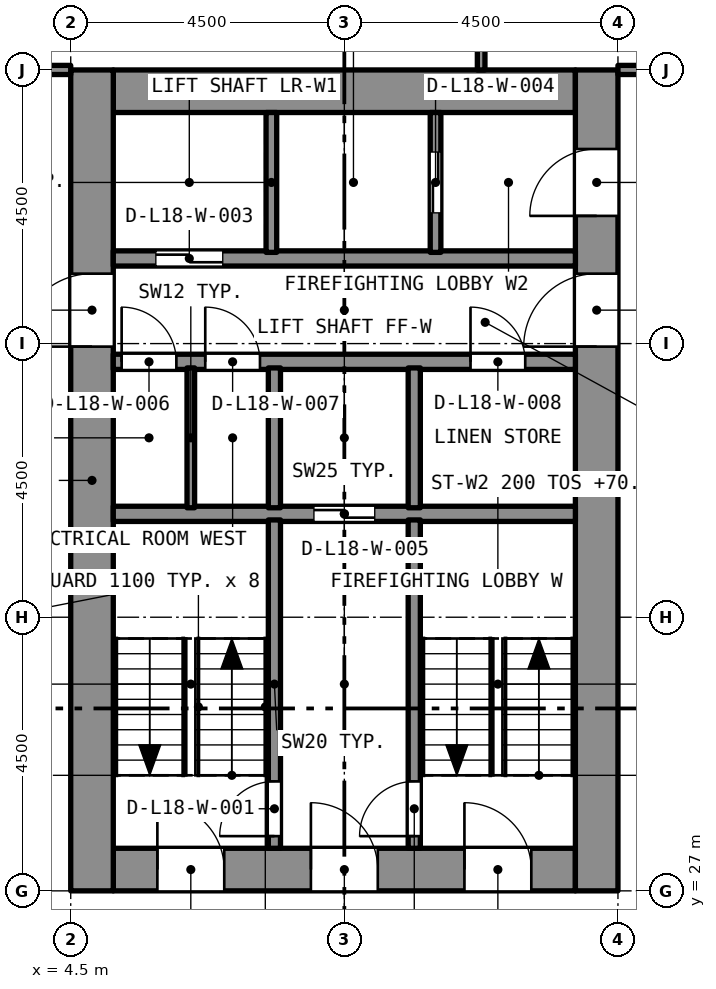
"""IFC4 building model, lengths in metres.
Left out: names, types, materials, properties, quantities, classifications, styles, units other than length and angle.
Written with IfcOpenShell. Run it as: python <this file> out.ifc"""

import sys

from ifc_helpers import new_model, si_unit, direction, frame, frame_2d, origin, place, context, subcontext, project, spatial, rectangle, extrude, element, fill, save


model = new_model("IFC4")
c1 = context("Model", 3, precision=1e-05, world=origin(), true_north=direction((0.0, 1.0)))
c2 = subcontext(c1, "Body", "Model", "MODEL_VIEW")
j1 = project(units=[si_unit("LENGTHUNIT", "METRE"), si_unit("PLANEANGLEUNIT", "RADIAN")], contexts=[c1])
p1 = place(None, origin())
s1 = spatial("IfcSite", under=j1, at=p1, CompositionType="ELEMENT")
p2 = place(p1, origin())
s2 = spatial("IfcBuilding", under=s1, at=p2, CompositionType="ELEMENT")
p3 = place(p2, frame((0.0, 0.0, 68.8)))
s3 = spatial("IfcBuildingStorey", under=s2, at=p3, CompositionType="ELEMENT", Elevation=68.8)
p4 = place(p3, frame((5.2, 27.35, 0.0), z_axis=(0.0, 0.0, 1.0), x_axis=(1.0, 0.0, 0.0)))
e1 = element("IfcWall", 1, at=p4, inside=s3, PredefinedType="SOLIDWALL", context=c2, shape_type="SweptSolid", body=[
    extrude(rectangle(XDim=7.6, YDim=0.7, at=frame_2d((3.8, 0.0))), origin(), (0.0, 0.0, 1.0), 3.2),
])
p5 = place(p4, frame((0.725, 0.0, 0.0)))
e2 = element("IfcOpeningElement", 2, at=p5, cuts=e1, PredefinedType="OPENING", context=c2, shape_type="SweptSolid", body=[
    extrude(rectangle(XDim=1.1, YDim=2.1, at=frame_2d((0.55, 1.05))), frame((0.0, 0.36, 0.0), z_axis=(0.0, -1.0, 0.0), x_axis=(1.0, 0.0, 0.0)), (0.0, 0.0, 1.0), 0.72),
])
p6 = place(p4, frame((3.25, 0.0, 0.0)))
e3 = element("IfcOpeningElement", 3, at=p6, cuts=e1, PredefinedType="OPENING", context=c2, shape_type="SweptSolid", body=[
    extrude(rectangle(XDim=1.1, YDim=2.1, at=frame_2d((0.55, 1.05))), frame((0.0, 0.36, 0.0), z_axis=(0.0, -1.0, 0.0), x_axis=(1.0, 0.0, 0.0)), (0.0, 0.0, 1.0), 0.72),
])
p7 = place(p4, frame((5.775, 0.0, 0.0)))
e4 = element("IfcOpeningElement", 4, at=p7, cuts=e1, PredefinedType="OPENING", context=c2, shape_type="SweptSolid", body=[
    extrude(rectangle(XDim=1.1, YDim=2.1, at=frame_2d((0.55, 1.05))), frame((0.0, 0.36, 0.0), z_axis=(0.0, -1.0, 0.0), x_axis=(1.0, 0.0, 0.0)), (0.0, 0.0, 1.0), 0.72),
])
p8 = place(p3, frame((5.2, 40.15, 0.0), z_axis=(0.0, 0.0, 1.0), x_axis=(1.0, 0.0, 0.0)))
e5 = element("IfcWall", 5, at=p8, inside=s3, PredefinedType="SOLIDWALL", context=c2, shape_type="SweptSolid", body=[
    extrude(rectangle(XDim=7.6, YDim=0.7, at=frame_2d((3.8, 0.0))), origin(), (0.0, 0.0, 1.0), 3.2),
])
p9 = place(p3, frame((4.85, 27.0, 0.0), z_axis=(0.0, 0.0, 1.0), x_axis=(0.0, 1.0, 0.0)))
e6 = element("IfcWall", 6, at=p9, inside=s3, PredefinedType="SOLIDWALL", context=c2, shape_type="SweptSolid", body=[
    extrude(rectangle(XDim=13.5, YDim=0.7, at=frame_2d((6.75, 0.0))), origin(), (0.0, 0.0, 1.0), 3.2),
])
p10 = place(p9, frame((8.95, 0.0, 0.0)))
e7 = element("IfcOpeningElement", 7, at=p10, cuts=e6, PredefinedType="OPENING", context=c2, shape_type="SweptSolid", body=[
    extrude(rectangle(XDim=1.2, YDim=2.1, at=frame_2d((0.6, 1.05))), frame((0.0, 0.36, 0.0), z_axis=(0.0, -1.0, 0.0), x_axis=(1.0, 0.0, 0.0)), (0.0, 0.0, 1.0), 0.72),
])
p11 = place(p3, frame((13.15, 27.0, 0.0), z_axis=(0.0, 0.0, 1.0), x_axis=(0.0, 1.0, 0.0)))
e8 = element("IfcWall", 8, at=p11, inside=s3, PredefinedType="SOLIDWALL", context=c2, shape_type="SweptSolid", body=[
    extrude(rectangle(XDim=13.5, YDim=0.7, at=frame_2d((6.75, 0.0))), origin(), (0.0, 0.0, 1.0), 3.2),
])
p12 = place(p11, frame((11.1, 0.0, 0.0)))
e9 = element("IfcOpeningElement", 9, at=p12, cuts=e8, PredefinedType="OPENING", context=c2, shape_type="SweptSolid", body=[
    extrude(rectangle(XDim=1.1, YDim=2.1, at=frame_2d((0.55, 1.05))), frame((0.0, 0.36, 0.0), z_axis=(0.0, -1.0, 0.0), x_axis=(1.0, 0.0, 0.0)), (0.0, 0.0, 1.0), 0.72),
])
p13 = place(p11, frame((8.95, 0.0, 0.0)))
e10 = element("IfcOpeningElement", 10, at=p13, cuts=e8, PredefinedType="OPENING", context=c2, shape_type="SweptSolid", body=[
    extrude(rectangle(XDim=1.2, YDim=2.1, at=frame_2d((0.6, 1.05))), frame((0.0, 0.36, 0.0), z_axis=(0.0, -1.0, 0.0), x_axis=(1.0, 0.0, 0.0)), (0.0, 0.0, 1.0), 0.72),
])
p14 = place(p3, frame((11.25, 40.5, 0.0), z_axis=(0.0, 0.0, 1.0), x_axis=(0.0, 1.0, 0.0)))
e11 = element("IfcWall", 11, at=p14, inside=s3, PredefinedType="PARTITIONING", context=c2, shape_type="SweptSolid", body=[
    extrude(rectangle(XDim=3.157, YDim=0.125, at=frame_2d((1.579, 0.0))), origin(), (0.0, 0.0, 1.0), 2.9),
])
p15 = place(p3, frame((13.5, 40.5, 0.0), z_axis=(0.0, 0.0, 1.0), x_axis=(1.0, 0.0, 0.0)))
e12 = element("IfcWall", 12, at=p15, inside=s3, PredefinedType="PARTITIONING", context=c2, shape_type="SweptSolid", body=[
    extrude(rectangle(XDim=3.8, YDim=0.15, at=frame_2d((1.9, 0.0))), origin(), (0.0, 0.0, 1.0), 2.9),
])
p16 = place(p3, frame((0.7, 40.5, 0.0), z_axis=(0.0, 0.0, 1.0), x_axis=(1.0, 0.0, 0.0)))
e13 = element("IfcWall", 13, at=p16, inside=s3, PredefinedType="PARTITIONING", context=c2, shape_type="SweptSolid", body=[
    extrude(rectangle(XDim=3.8, YDim=0.15, at=frame_2d((1.9, 0.0))), origin(), (0.0, 0.0, 1.0), 2.9),
])
p17 = place(p16, frame((1.05, 0.0, 0.0)))
e14 = element("IfcOpeningElement", 14, at=p17, cuts=e13, PredefinedType="OPENING", context=c2, shape_type="SweptSolid", body=[
    extrude(rectangle(XDim=1.0, YDim=2.1, at=frame_2d((0.5, 1.05))), frame((0.0, 0.085, 0.0), z_axis=(0.0, -1.0, 0.0), x_axis=(1.0, 0.0, 0.0)), (0.0, 0.0, 1.0), 0.17),
])
p18 = place(p3, frame((5.2, 33.2, 0.0), z_axis=(0.0, 0.0, 1.0), x_axis=(1.0, 0.0, 0.0)))
e15 = element("IfcWall", 15, at=p18, inside=s3, PredefinedType="SOLIDWALL", context=c2, shape_type="SweptSolid", body=[
    extrude(rectangle(XDim=7.6, YDim=0.25, at=frame_2d((3.8, 0.0))), origin(), (0.0, 0.0, 1.0), 2.9),
])
p19 = place(p18, frame((3.3, 0.0, 0.0)))
e16 = element("IfcOpeningElement", 16, at=p19, cuts=e15, PredefinedType="OPENING", context=c2, shape_type="SweptSolid", body=[
    extrude(rectangle(XDim=1.0, YDim=2.1, at=frame_2d((0.5, 1.05))), frame((0.0, 0.135, 0.0), z_axis=(0.0, -1.0, 0.0), x_axis=(1.0, 0.0, 0.0)), (0.0, 0.0, 1.0), 0.27),
])
p20 = place(p3, frame((5.2, 35.7, 0.0), z_axis=(0.0, 0.0, 1.0), x_axis=(1.0, 0.0, 0.0)))
e17 = element("IfcWall", 17, at=p20, inside=s3, PredefinedType="SOLIDWALL", context=c2, shape_type="SweptSolid", body=[
    extrude(rectangle(XDim=7.6, YDim=0.25, at=frame_2d((3.8, 0.0))), origin(), (0.0, 0.0, 1.0), 2.9),
])
p21 = place(p20, frame((0.137, 0.0, 0.0)))
e18 = element("IfcOpeningElement", 18, at=p21, cuts=e17, PredefinedType="OPENING", context=c2, shape_type="SweptSolid", body=[
    extrude(rectangle(XDim=0.9, YDim=2.1, at=frame_2d((0.45, 1.05))), frame((0.0, 0.135, 0.0), z_axis=(0.0, -1.0, 0.0), x_axis=(1.0, 0.0, 0.0)), (0.0, 0.0, 1.0), 0.27),
])
p22 = place(p20, frame((1.512, 0.0, 0.0)))
e19 = element("IfcOpeningElement", 19, at=p22, cuts=e17, PredefinedType="OPENING", context=c2, shape_type="SweptSolid", body=[
    extrude(rectangle(XDim=0.9, YDim=2.1, at=frame_2d((0.45, 1.05))), frame((0.0, 0.135, 0.0), z_axis=(0.0, -1.0, 0.0), x_axis=(1.0, 0.0, 0.0)), (0.0, 0.0, 1.0), 0.27),
])
p23 = place(p20, frame((5.875, 0.0, 0.0)))
e20 = element("IfcOpeningElement", 20, at=p23, cuts=e17, PredefinedType="OPENING", context=c2, shape_type="SweptSolid", body=[
    extrude(rectangle(XDim=0.9, YDim=2.1, at=frame_2d((0.45, 1.05))), frame((0.0, 0.135, 0.0), z_axis=(0.0, -1.0, 0.0), x_axis=(1.0, 0.0, 0.0)), (0.0, 0.0, 1.0), 0.27),
])
p24 = place(p3, frame((5.2, 37.4, 0.0), z_axis=(0.0, 0.0, 1.0), x_axis=(1.0, 0.0, 0.0)))
e21 = element("IfcWall", 21, at=p24, inside=s3, PredefinedType="SOLIDWALL", context=c2, shape_type="SweptSolid", body=[
    extrude(rectangle(XDim=7.6, YDim=0.25, at=frame_2d((3.8, 0.0))), origin(), (0.0, 0.0, 1.0), 2.9),
])
p25 = place(p24, frame((0.7, 0.0, 0.0)))
e22 = element("IfcOpeningElement", 22, at=p25, cuts=e21, PredefinedType="OPENING", context=c2, shape_type="SweptSolid", body=[
    extrude(rectangle(XDim=1.1, YDim=2.4, at=frame_2d((0.55, 1.2))), frame((0.0, 0.135, 0.0), z_axis=(0.0, -1.0, 0.0), x_axis=(1.0, 0.0, 0.0)), (0.0, 0.0, 1.0), 0.27),
])
p26 = place(p3, frame((7.85, 27.7, 0.0), z_axis=(0.0, 0.0, 1.0), x_axis=(0.0, 1.0, 0.0)))
e23 = element("IfcWall", 23, at=p26, inside=s3, PredefinedType="SOLIDWALL", context=c2, shape_type="SweptSolid", body=[
    extrude(rectangle(XDim=5.4, YDim=0.2, at=frame_2d((2.7, 0.0))), origin(), (0.0, 0.0, 1.0), 2.9),
])
p27 = place(p26, frame((0.2, 0.0, 0.0)))
e24 = element("IfcOpeningElement", 24, at=p27, cuts=e23, PredefinedType="OPENING", context=c2, shape_type="SweptSolid", body=[
    extrude(rectangle(XDim=0.9, YDim=2.1, at=frame_2d((0.45, 1.05))), frame((0.0, 0.11, 0.0), z_axis=(0.0, -1.0, 0.0), x_axis=(1.0, 0.0, 0.0)), (0.0, 0.0, 1.0), 0.22),
])
p28 = place(p3, frame((10.15, 27.7, 0.0), z_axis=(0.0, 0.0, 1.0), x_axis=(0.0, 1.0, 0.0)))
e25 = element("IfcWall", 25, at=p28, inside=s3, PredefinedType="SOLIDWALL", context=c2, shape_type="SweptSolid", body=[
    extrude(rectangle(XDim=5.4, YDim=0.2, at=frame_2d((2.7, 0.0))), origin(), (0.0, 0.0, 1.0), 2.9),
])
p29 = place(p28, frame((0.2, 0.0, 0.0)))
e26 = element("IfcOpeningElement", 26, at=p29, cuts=e25, PredefinedType="OPENING", context=c2, shape_type="SweptSolid", body=[
    extrude(rectangle(XDim=0.9, YDim=2.1, at=frame_2d((0.45, 1.05))), frame((0.0, 0.11, 0.0), z_axis=(0.0, -1.0, 0.0), x_axis=(1.0, 0.0, 0.0)), (0.0, 0.0, 1.0), 0.22),
])
for number, where, z_axis, x_axis in (
    (27, (7.85, 33.3, 0.0), (0.0, 0.0, 1.0), (0.0, 1.0, 0.0)),
    (28, (10.15, 33.3, 0.0), (0.0, 0.0, 1.0), (0.0, 1.0, 0.0)),
):
    element("IfcWall", number, at=place(p3, frame(where, z_axis=z_axis, x_axis=x_axis)), inside=s3, PredefinedType="SOLIDWALL", context=c2, shape_type="SweptSolid", body=[
        extrude(rectangle(XDim=2.3, YDim=0.2, at=frame_2d((1.15, 0.0))), origin(), (0.0, 0.0, 1.0), 2.9),
    ])
p30 = place(p3, frame((7.8, 37.5, 0.0), z_axis=(0.0, 0.0, 1.0), x_axis=(0.0, 1.0, 0.0)))
e29 = element("IfcWall", 29, at=p30, inside=s3, PredefinedType="SOLIDWALL", context=c2, shape_type="SweptSolid", body=[
    extrude(rectangle(XDim=2.3, YDim=0.175, at=frame_2d((1.15, 0.0))), origin(), (0.0, 0.0, 1.0), 2.9),
])
p31 = place(p3, frame((10.5, 37.5, 0.0), z_axis=(0.0, 0.0, 1.0), x_axis=(0.0, 1.0, 0.0)))
e30 = element("IfcWall", 30, at=p31, inside=s3, PredefinedType="SOLIDWALL", context=c2, shape_type="SweptSolid", body=[
    extrude(rectangle(XDim=2.3, YDim=0.175, at=frame_2d((1.15, 0.0))), origin(), (0.0, 0.0, 1.0), 2.9),
])
p32 = place(p31, frame((0.65, 0.0, 0.0)))
e31 = element("IfcOpeningElement", 31, at=p32, cuts=e30, PredefinedType="OPENING", context=c2, shape_type="SweptSolid", body=[
    extrude(rectangle(XDim=1.0, YDim=2.1, at=frame_2d((0.5, 1.05))), frame((0.0, 0.097, 0.0), z_axis=(0.0, -1.0, 0.0), x_axis=(1.0, 0.0, 0.0)), (0.0, 0.0, 1.0), 0.195),
])
p33 = place(p3, frame((6.475, 33.3, 0.0), z_axis=(0.0, 0.0, 1.0), x_axis=(0.0, 1.0, 0.0)))
e32 = element("IfcWall", 32, at=p33, inside=s3, PredefinedType="PARTITIONING", context=c2, shape_type="SweptSolid", body=[
    extrude(rectangle(XDim=2.3, YDim=0.125, at=frame_2d((1.15, 0.0))), origin(), (0.0, 0.0, 1.0), 2.9),
])
p34 = place(p27, origin())
e33 = element("IfcDoor", 33, at=p34, inside=s3, OperationType="SINGLE_SWING_LEFT", PredefinedType="DOOR", context=c2, shape_type="SweptSolid", body=[
    extrude(rectangle(XDim=0.9, YDim=2.1, at=frame_2d((0.45, 1.05))), frame((0.0, 0.025, 0.0), z_axis=(0.0, -1.0, 0.0), x_axis=(1.0, 0.0, 0.0)), (0.0, 0.0, 1.0), 0.05),
])
fill(e24, e33)
p35 = place(p29, origin())
e34 = element("IfcDoor", 34, at=p35, inside=s3, OperationType="SINGLE_SWING_LEFT", PredefinedType="DOOR", context=c2, shape_type="SweptSolid", body=[
    extrude(rectangle(XDim=0.9, YDim=2.1, at=frame_2d((0.45, 1.05))), frame((0.0, 0.025, 0.0), z_axis=(0.0, -1.0, 0.0), x_axis=(1.0, 0.0, 0.0)), (0.0, 0.0, 1.0), 0.05),
])
fill(e26, e34)
p36 = place(p25, origin())
e35 = element("IfcDoor", 35, at=p36, inside=s3, OperationType="SLIDING_TO_LEFT", PredefinedType="DOOR", context=c2, shape_type="SweptSolid", body=[
    extrude(rectangle(XDim=1.1, YDim=2.4, at=frame_2d((0.55, 1.2))), frame((0.0, 0.025, 0.0), z_axis=(0.0, -1.0, 0.0), x_axis=(1.0, 0.0, 0.0)), (0.0, 0.0, 1.0), 0.05),
])
fill(e22, e35)
p37 = place(p32, origin())
e36 = element("IfcDoor", 36, at=p37, inside=s3, OperationType="SLIDING_TO_LEFT", PredefinedType="DOOR", context=c2, shape_type="SweptSolid", body=[
    extrude(rectangle(XDim=1.0, YDim=2.1, at=frame_2d((0.5, 1.05))), frame((0.0, 0.025, 0.0), z_axis=(0.0, -1.0, 0.0), x_axis=(1.0, 0.0, 0.0)), (0.0, 0.0, 1.0), 0.05),
])
fill(e31, e36)
p38 = place(p19, origin())
e37 = element("IfcDoor", 37, at=p38, inside=s3, OperationType="SLIDING_TO_LEFT", PredefinedType="DOOR", context=c2, shape_type="SweptSolid", body=[
    extrude(rectangle(XDim=1.0, YDim=2.1, at=frame_2d((0.5, 1.05))), frame((0.0, 0.025, 0.0), z_axis=(0.0, -1.0, 0.0), x_axis=(1.0, 0.0, 0.0)), (0.0, 0.0, 1.0), 0.05),
])
fill(e16, e37)
p39 = place(p21, origin())
e38 = element("IfcDoor", 38, at=p39, inside=s3, OperationType="SINGLE_SWING_LEFT", PredefinedType="DOOR", context=c2, shape_type="SweptSolid", body=[
    extrude(rectangle(XDim=0.9, YDim=2.1, at=frame_2d((0.45, 1.05))), frame((0.0, 0.025, 0.0), z_axis=(0.0, -1.0, 0.0), x_axis=(1.0, 0.0, 0.0)), (0.0, 0.0, 1.0), 0.05),
])
fill(e18, e38)
p40 = place(p22, origin())
e39 = element("IfcDoor", 39, at=p40, inside=s3, OperationType="SINGLE_SWING_LEFT", PredefinedType="DOOR", context=c2, shape_type="SweptSolid", body=[
    extrude(rectangle(XDim=0.9, YDim=2.1, at=frame_2d((0.45, 1.05))), frame((0.0, 0.025, 0.0), z_axis=(0.0, -1.0, 0.0), x_axis=(1.0, 0.0, 0.0)), (0.0, 0.0, 1.0), 0.05),
])
fill(e19, e39)
p41 = place(p23, origin())
e40 = element("IfcDoor", 40, at=p41, inside=s3, OperationType="SINGLE_SWING_LEFT", PredefinedType="DOOR", context=c2, shape_type="SweptSolid", body=[
    extrude(rectangle(XDim=0.9, YDim=2.1, at=frame_2d((0.45, 1.05))), frame((0.0, 0.025, 0.0), z_axis=(0.0, -1.0, 0.0), x_axis=(1.0, 0.0, 0.0)), (0.0, 0.0, 1.0), 0.05),
])
fill(e20, e40)
p42 = place(p5, origin())
e41 = element("IfcDoor", 41, at=p42, inside=s3, OperationType="SINGLE_SWING_LEFT", PredefinedType="DOOR", context=c2, shape_type="SweptSolid", body=[
    extrude(rectangle(XDim=1.1, YDim=2.1, at=frame_2d((0.55, 1.05))), frame((0.0, 0.025, 0.0), z_axis=(0.0, -1.0, 0.0), x_axis=(1.0, 0.0, 0.0)), (0.0, 0.0, 1.0), 0.05),
])
fill(e2, e41)
p43 = place(p6, origin())
e42 = element("IfcDoor", 42, at=p43, inside=s3, OperationType="SINGLE_SWING_LEFT", PredefinedType="DOOR", context=c2, shape_type="SweptSolid", body=[
    extrude(rectangle(XDim=1.1, YDim=2.1, at=frame_2d((0.55, 1.05))), frame((0.0, 0.025, 0.0), z_axis=(0.0, -1.0, 0.0), x_axis=(1.0, 0.0, 0.0)), (0.0, 0.0, 1.0), 0.05),
])
fill(e3, e42)
p44 = place(p7, origin())
e43 = element("IfcDoor", 43, at=p44, inside=s3, OperationType="SINGLE_SWING_LEFT", PredefinedType="DOOR", context=c2, shape_type="SweptSolid", body=[
    extrude(rectangle(XDim=1.1, YDim=2.1, at=frame_2d((0.55, 1.05))), frame((0.0, 0.025, 0.0), z_axis=(0.0, -1.0, 0.0), x_axis=(1.0, 0.0, 0.0)), (0.0, 0.0, 1.0), 0.05),
])
fill(e4, e43)
p45 = place(p12, origin())
e44 = element("IfcDoor", 44, at=p45, inside=s3, OperationType="SINGLE_SWING_LEFT", PredefinedType="DOOR", context=c2, shape_type="SweptSolid", body=[
    extrude(rectangle(XDim=1.1, YDim=2.1, at=frame_2d((0.55, 1.05))), frame((0.0, 0.025, 0.0), z_axis=(0.0, -1.0, 0.0), x_axis=(1.0, 0.0, 0.0)), (0.0, 0.0, 1.0), 0.05),
])
fill(e9, e44)
p46 = place(p10, origin())
e45 = element("IfcDoor", 45, at=p46, inside=s3, OperationType="SINGLE_SWING_LEFT", PredefinedType="DOOR", context=c2, shape_type="SweptSolid", body=[
    extrude(rectangle(XDim=1.2, YDim=2.1, at=frame_2d((0.6, 1.05))), frame((0.0, 0.025, 0.0), z_axis=(0.0, -1.0, 0.0), x_axis=(1.0, 0.0, 0.0)), (0.0, 0.0, 1.0), 0.05),
])
fill(e7, e45)
p47 = place(p13, origin())
e46 = element("IfcDoor", 46, at=p47, inside=s3, OperationType="SINGLE_SWING_LEFT", PredefinedType="DOOR", context=c2, shape_type="SweptSolid", body=[
    extrude(rectangle(XDim=1.2, YDim=2.1, at=frame_2d((0.6, 1.05))), frame((0.0, 0.025, 0.0), z_axis=(0.0, -1.0, 0.0), x_axis=(1.0, 0.0, 0.0)), (0.0, 0.0, 1.0), 0.05),
])
fill(e10, e46)
save(model, sys.argv[1])
